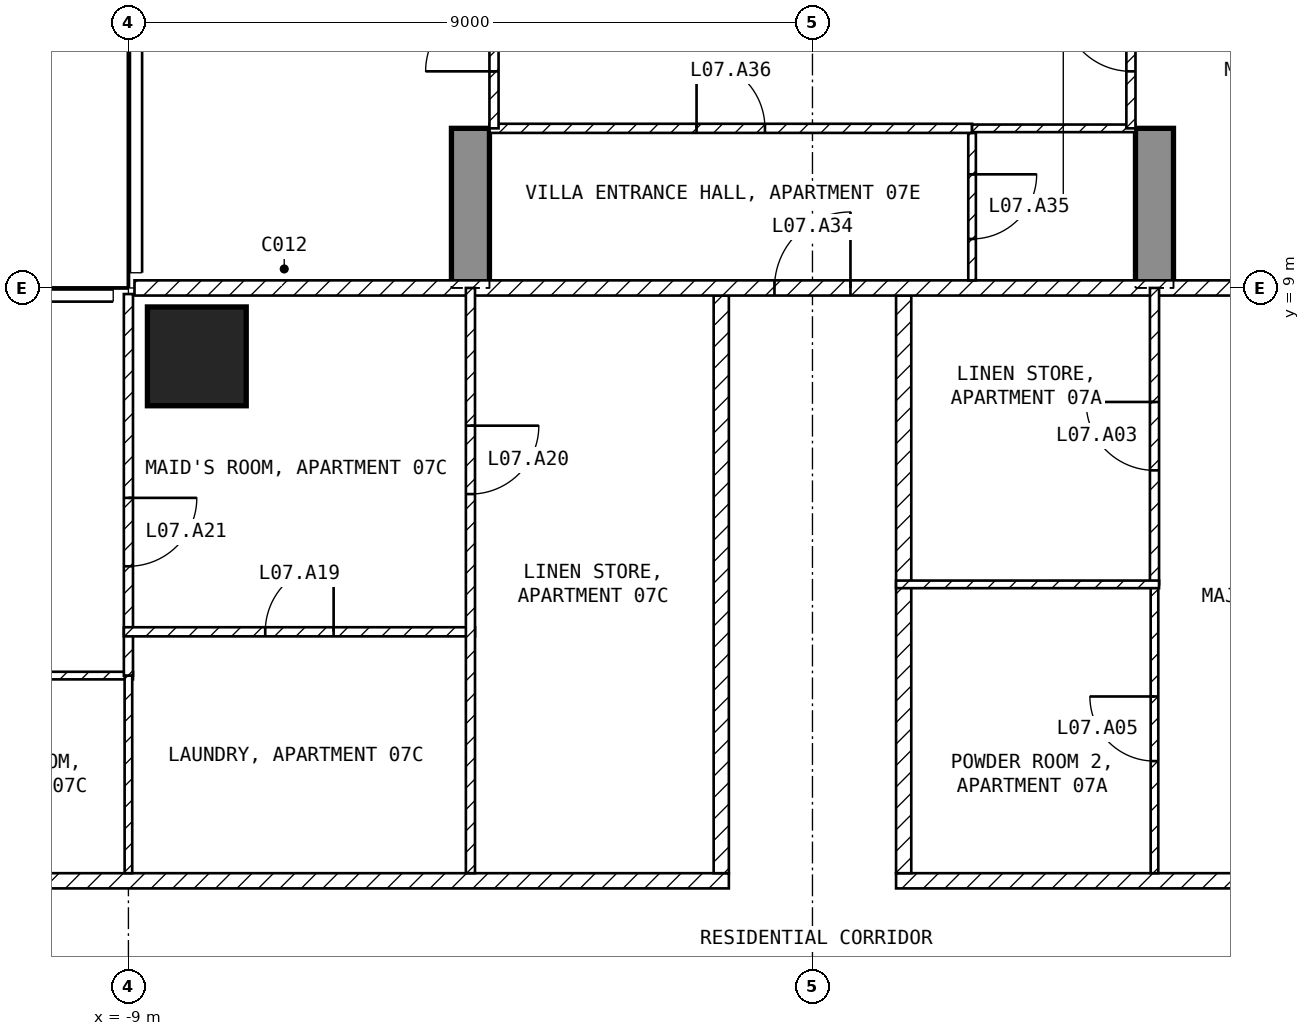
"""IFC4 building model, lengths in metres.
Left out: names, types, materials, properties, quantities, classifications, styles, units other than length and angle.
Written with IfcOpenShell. Run it as: python <this file> out.ifc"""

import sys

from ifc_helpers import new_model, si_unit, direction, frame, frame_2d, origin, origin_2d, place, context, subcontext, project, spatial, polyline, rectangle, outline, extrude, element, fill, save


model = new_model("IFC4")
c1 = context("Model", 3, precision=1e-05, world=origin(), true_north=direction((0.0, 1.0)))
c2 = subcontext(c1, "Body", "Model", "MODEL_VIEW")
j1 = project(units=[si_unit("LENGTHUNIT", "METRE"), si_unit("PLANEANGLEUNIT", "RADIAN")], contexts=[c1])
p1 = place(None, origin())
s1 = spatial("IfcSite", under=j1, at=p1, CompositionType="ELEMENT")
p2 = place(p1, origin())
s2 = spatial("IfcBuilding", under=s1, at=p2, CompositionType="ELEMENT")
p3 = place(p2, frame((0.0, 0.0, 43.5)))
s3 = spatial("IfcBuildingStorey", under=s2, at=p3, CompositionType="ELEMENT", Elevation=43.5)
p4 = place(p3, frame((-8.1, 8.1, -0.25), z_axis=(0.0, 0.0, 1.0), x_axis=(1.0, 0.0, 0.0)))
e1 = element("IfcColumn", 1, at=p4, inside=s3, PredefinedType="COLUMN", context=c2, shape_type="SweptSolid", body=[
    extrude(rectangle(XDim=1.3, YDim=1.3, at=origin_2d()), origin(), (0.0, 0.0, 1.0), 3.5),
])
for number, where, z_axis, x_axis in (
    (2, (-4.75, 9.0, -0.25), (1.0, 0.0, 0.0), (0.0, 1.0, 0.0)),
    (3, (4.25, 9.0, -0.25), (1.0, 0.0, 0.0), (0.0, 1.0, 0.0)),
):
    element("IfcWall", number, at=place(p3, frame(where, z_axis=z_axis, x_axis=x_axis)), inside=s3, PredefinedType="SHEAR", context=c2, shape_type="SweptSolid", body=[
        extrude(outline(polyline([(0.0, 0.0), (2.1, 0.0), (2.1, 2.65), (4.5, 2.65), (4.5, 0.0), (9.9, 0.0), (9.9, 2.65), (12.3, 2.65), (12.3, 0.0), (16.45, 0.0), (16.45, 3.5), (0.0, 3.5), (0.0, 0.0)])), origin(), (0.0, 0.0, 1.0), 0.5),
    ])
p5 = place(p3, frame((1.1, 1.2, 0.0), z_axis=(0.0, 0.0, 1.0), x_axis=(1.0, 0.0, 0.0)))
e4 = element("IfcWall", 4, at=p5, inside=s3, PredefinedType="PARTITIONING", context=c2, shape_type="SweptSolid", body=[
    extrude(rectangle(XDim=20.5, YDim=0.2, at=frame_2d((10.25, 0.0))), origin(), (0.0, 0.0, 1.0), 3.25),
])
p6 = place(p5, frame((8.6, 0.0, 0.0)))
e5 = element("IfcOpeningElement", 5, at=p6, cuts=e4, PredefinedType="OPENING", context=c2, shape_type="SweptSolid", body=[
    extrude(rectangle(XDim=1.0, YDim=2.1, at=frame_2d((0.5, 1.05))), frame((0.0, 0.11, 0.0), z_axis=(0.0, -1.0, 0.0), x_axis=(1.0, 0.0, 0.0)), (0.0, 0.0, 1.0), 0.22),
])
p7 = place(p3, frame((1.2, 8.9, 0.0), z_axis=(0.0, 0.0, 1.0), x_axis=(0.0, -1.0, 0.0)))
e6 = element("IfcWall", 6, at=p7, inside=s3, PredefinedType="PARTITIONING", context=c2, shape_type="SweptSolid", body=[
    extrude(rectangle(XDim=7.6, YDim=0.2, at=frame_2d((3.8, 0.0))), origin(), (0.0, 0.0, 1.0), 3.25),
])
p8 = place(p3, frame((-21.6, 1.2, 0.0), z_axis=(0.0, 0.0, 1.0), x_axis=(1.0, 0.0, 0.0)))
e7 = element("IfcWall", 7, at=p8, inside=s3, PredefinedType="PARTITIONING", context=c2, shape_type="SweptSolid", body=[
    extrude(rectangle(XDim=20.5, YDim=0.2, at=frame_2d((10.25, 0.0))), origin(), (0.0, 0.0, 1.0), 3.25),
])
p9 = place(p8, frame((7.225, 0.0, 0.0)))
e8 = element("IfcOpeningElement", 8, at=p9, cuts=e7, PredefinedType="OPENING", context=c2, shape_type="SweptSolid", body=[
    extrude(rectangle(XDim=1.0, YDim=2.1, at=frame_2d((0.5, 1.05))), frame((0.0, 0.11, 0.0), z_axis=(0.0, -1.0, 0.0), x_axis=(1.0, 0.0, 0.0)), (0.0, 0.0, 1.0), 0.22),
])
p10 = place(p3, frame((-1.2, 1.3, 0.0), z_axis=(0.0, 0.0, 1.0), x_axis=(0.0, 1.0, 0.0)))
e9 = element("IfcWall", 9, at=p10, inside=s3, PredefinedType="PARTITIONING", context=c2, shape_type="SweptSolid", body=[
    extrude(rectangle(XDim=7.6, YDim=0.2, at=frame_2d((3.8, 0.0))), origin(), (0.0, 0.0, 1.0), 3.25),
])
p11 = place(p3, frame((-8.92, 9.0, 0.0), z_axis=(0.0, 0.0, 1.0), x_axis=(1.0, 0.0, 0.0)))
e10 = element("IfcWall", 10, at=p11, inside=s3, PredefinedType="PARTITIONING", context=c2, shape_type="SweptSolid", body=[
    extrude(rectangle(XDim=17.84, YDim=0.2, at=frame_2d((8.92, 0.0))), origin(), (0.0, 0.0, 1.0), 3.25),
])
p12 = place(p11, frame((8.42, 0.0, 0.0)))
e11 = element("IfcOpeningElement", 11, at=p12, cuts=e10, PredefinedType="OPENING", context=c2, shape_type="SweptSolid", body=[
    extrude(rectangle(XDim=1.0, YDim=2.1, at=frame_2d((0.5, 1.05))), frame((0.0, 0.11, 0.0), z_axis=(0.0, -1.0, 0.0), x_axis=(1.0, 0.0, 0.0)), (0.0, 0.0, 1.0), 0.22),
])
p13 = place(p3, frame((4.5, 1.3, 0.0), z_axis=(0.0, 0.0, 1.0), x_axis=(0.0, 1.0, 0.0)))
e12 = element("IfcWall", 12, at=p13, inside=s3, PredefinedType="PARTITIONING", context=c2, shape_type="SweptSolid", body=[
    extrude(rectangle(XDim=3.8, YDim=0.1, at=frame_2d((1.9, 0.0))), origin(), (0.0, 0.0, 1.0), 3.25),
])
p14 = place(p13, frame((1.475, 0.0, 0.0)))
e13 = element("IfcOpeningElement", 13, at=p14, cuts=e12, PredefinedType="OPENING", context=c2, shape_type="SweptSolid", body=[
    extrude(rectangle(XDim=0.85, YDim=2.1, at=frame_2d((0.425, 1.05))), frame((0.0, 0.06, 0.0), z_axis=(0.0, -1.0, 0.0), x_axis=(1.0, 0.0, 0.0)), (0.0, 0.0, 1.0), 0.12),
])
p15 = place(p3, frame((4.5, 5.1, 0.0), z_axis=(0.0, 0.0, 1.0), x_axis=(0.0, 1.0, 0.0)))
e14 = element("IfcWall", 14, at=p15, inside=s3, PredefinedType="PARTITIONING", context=c2, shape_type="SweptSolid", body=[
    extrude(rectangle(XDim=3.9, YDim=0.12, at=frame_2d((1.95, 0.0))), origin(), (0.0, 0.0, 1.0), 3.25),
])
p16 = place(p15, frame((1.5, 0.0, 0.0)))
e15 = element("IfcOpeningElement", 15, at=p16, cuts=e14, PredefinedType="OPENING", context=c2, shape_type="SweptSolid", body=[
    extrude(rectangle(XDim=0.9, YDim=2.1, at=frame_2d((0.45, 1.05))), frame((0.0, 0.07, 0.0), z_axis=(0.0, -1.0, 0.0), x_axis=(1.0, 0.0, 0.0)), (0.0, 0.0, 1.0), 0.14),
])
p17 = place(p3, frame((1.1, 5.1, 0.0), z_axis=(0.0, 0.0, 1.0), x_axis=(1.0, 0.0, 0.0)))
e16 = element("IfcWall", 16, at=p17, inside=s3, PredefinedType="PARTITIONING", context=c2, shape_type="SweptSolid", body=[
    extrude(rectangle(XDim=3.46, YDim=0.1, at=frame_2d((1.73, 0.0))), origin(), (0.0, 0.0, 1.0), 3.25),
])
p18 = place(p3, frame((-12.15, 3.9, 0.0), z_axis=(0.0, 0.0, 1.0), x_axis=(1.0, 0.0, 0.0)))
e17 = element("IfcWall", 17, at=p18, inside=s3, PredefinedType="PARTITIONING", context=c2, shape_type="SweptSolid", body=[
    extrude(rectangle(XDim=3.21, YDim=0.1, at=frame_2d((1.605, 0.0))), origin(), (0.0, 0.0, 1.0), 3.25),
])
p19 = place(p3, frame((-9.0, 3.9, 0.0), z_axis=(0.0, 0.0, 1.0), x_axis=(0.0, -1.0, 0.0)))
e18 = element("IfcWall", 18, at=p19, inside=s3, PredefinedType="PARTITIONING", context=c2, shape_type="SweptSolid", body=[
    extrude(rectangle(XDim=2.6, YDim=0.1, at=frame_2d((1.3, 0.0))), origin(), (0.0, 0.0, 1.0), 3.25),
])
p20 = place(p3, frame((-9.0, 8.92, 0.0), z_axis=(0.0, 0.0, 1.0), x_axis=(0.0, -1.0, 0.0)))
e19 = element("IfcWall", 19, at=p20, inside=s3, PredefinedType="PARTITIONING", context=c2, shape_type="SweptSolid", body=[
    extrude(rectangle(XDim=5.02, YDim=0.12, at=frame_2d((2.51, 0.0))), origin(), (0.0, 0.0, 1.0), 3.25),
])
p21 = place(p20, frame((2.682, 0.0, 0.0)))
e20 = element("IfcOpeningElement", 20, at=p21, cuts=e19, PredefinedType="OPENING", context=c2, shape_type="SweptSolid", body=[
    extrude(rectangle(XDim=0.9, YDim=2.1, at=frame_2d((0.45, 1.05))), frame((0.0, 0.07, 0.0), z_axis=(0.0, -1.0, 0.0), x_axis=(1.0, 0.0, 0.0)), (0.0, 0.0, 1.0), 0.14),
])
p22 = place(p3, frame((-9.06, 4.476, 0.0), z_axis=(0.0, 0.0, 1.0), x_axis=(1.0, 0.0, 0.0)))
e21 = element("IfcWall", 21, at=p22, inside=s3, PredefinedType="PARTITIONING", context=c2, shape_type="SweptSolid", body=[
    extrude(rectangle(XDim=4.62, YDim=0.12, at=frame_2d((2.31, 0.0))), origin(), (0.0, 0.0, 1.0), 3.25),
])
p23 = place(p22, frame((1.86, 0.0, 0.0)))
e22 = element("IfcOpeningElement", 22, at=p23, cuts=e21, PredefinedType="OPENING", context=c2, shape_type="SweptSolid", body=[
    extrude(rectangle(XDim=0.9, YDim=2.1, at=frame_2d((0.45, 1.05))), frame((0.0, 0.07, 0.0), z_axis=(0.0, -1.0, 0.0), x_axis=(1.0, 0.0, 0.0)), (0.0, 0.0, 1.0), 0.14),
])
p24 = place(p3, frame((-4.5, 9.0, 0.0), z_axis=(0.0, 0.0, 1.0), x_axis=(0.0, -1.0, 0.0)))
e23 = element("IfcWall", 23, at=p24, inside=s3, PredefinedType="PARTITIONING", context=c2, shape_type="SweptSolid", body=[
    extrude(rectangle(XDim=7.7, YDim=0.12, at=frame_2d((3.85, 0.0))), origin(), (0.0, 0.0, 1.0), 3.25),
])
p25 = place(p24, frame((1.812, 0.0, 0.0)))
e24 = element("IfcOpeningElement", 24, at=p25, cuts=e23, PredefinedType="OPENING", context=c2, shape_type="SweptSolid", body=[
    extrude(rectangle(XDim=0.9, YDim=2.1, at=frame_2d((0.45, 1.05))), frame((0.0, 0.07, 0.0), z_axis=(0.0, -1.0, 0.0), x_axis=(1.0, 0.0, 0.0)), (0.0, 0.0, 1.0), 0.14),
])
p26 = place(p3, frame((2.1, 11.04, 0.0), z_axis=(0.0, 0.0, 1.0), x_axis=(0.0, -1.0, 0.0)))
e25 = element("IfcWall", 25, at=p26, inside=s3, PredefinedType="PARTITIONING", context=c2, shape_type="SweptSolid", body=[
    extrude(rectangle(XDim=1.94, YDim=0.1, at=frame_2d((0.97, 0.0))), origin(), (0.0, 0.0, 1.0), 3.25),
])
p27 = place(p26, frame((0.545, 0.0, 0.0)))
e26 = element("IfcOpeningElement", 26, at=p27, cuts=e25, PredefinedType="OPENING", context=c2, shape_type="SweptSolid", body=[
    extrude(rectangle(XDim=0.85, YDim=2.1, at=frame_2d((0.425, 1.05))), frame((0.0, 0.06, 0.0), z_axis=(0.0, -1.0, 0.0), x_axis=(1.0, 0.0, 0.0)), (0.0, 0.0, 1.0), 0.12),
])
p28 = place(p3, frame((-4.25, 11.1, 0.0), z_axis=(0.0, 0.0, 1.0), x_axis=(1.0, 0.0, 0.0)))
e27 = element("IfcWall", 27, at=p28, inside=s3, PredefinedType="PARTITIONING", context=c2, shape_type="SweptSolid", body=[
    extrude(rectangle(XDim=6.35, YDim=0.12, at=frame_2d((3.175, 0.0))), origin(), (0.0, 0.0, 1.0), 3.25),
])
p29 = place(p28, frame((2.725, 0.0, 0.0)))
e28 = element("IfcOpeningElement", 28, at=p29, cuts=e27, PredefinedType="OPENING", context=c2, shape_type="SweptSolid", body=[
    extrude(rectangle(XDim=0.9, YDim=2.1, at=frame_2d((0.45, 1.05))), frame((0.0, 0.07, 0.0), z_axis=(0.0, -1.0, 0.0), x_axis=(1.0, 0.0, 0.0)), (0.0, 0.0, 1.0), 0.14),
])
p30 = place(p3, frame((2.1, 11.1, 0.0), z_axis=(0.0, 0.0, 1.0), x_axis=(1.0, 0.0, 0.0)))
e29 = element("IfcWall", 29, at=p30, inside=s3, PredefinedType="PARTITIONING", context=c2, shape_type="SweptSolid", body=[
    extrude(rectangle(XDim=2.15, YDim=0.1, at=frame_2d((1.075, 0.0))), origin(), (0.0, 0.0, 1.0), 3.25),
])
p31 = place(p3, frame((4.19, 11.1, 0.0), z_axis=(0.0, 0.0, 1.0), x_axis=(0.0, 1.0, 0.0)))
e30 = element("IfcWall", 30, at=p31, inside=s3, PredefinedType="PARTITIONING", context=c2, shape_type="SweptSolid", body=[
    extrude(rectangle(XDim=2.4, YDim=0.12, at=frame_2d((1.2, 0.0))), origin(), (0.0, 0.0, 1.0), 2.4),
])
p32 = place(p31, frame((0.75, 0.0, 0.0)))
e31 = element("IfcOpeningElement", 31, at=p32, cuts=e30, PredefinedType="OPENING", context=c2, shape_type="SweptSolid", body=[
    extrude(rectangle(XDim=0.9, YDim=2.1, at=frame_2d((0.45, 1.05))), frame((0.0, 0.07, 0.0), z_axis=(0.0, -1.0, 0.0), x_axis=(1.0, 0.0, 0.0)), (0.0, 0.0, 1.0), 0.14),
])
p33 = place(p3, frame((-4.19, 11.1, 0.0), z_axis=(0.0, 0.0, 1.0), x_axis=(0.0, 1.0, 0.0)))
e32 = element("IfcWall", 32, at=p33, inside=s3, PredefinedType="PARTITIONING", context=c2, shape_type="SweptSolid", body=[
    extrude(rectangle(XDim=2.4, YDim=0.12, at=frame_2d((1.2, 0.0))), origin(), (0.0, 0.0, 1.0), 2.4),
])
p34 = place(p33, frame((0.75, 0.0, 0.0)))
e33 = element("IfcOpeningElement", 33, at=p34, cuts=e32, PredefinedType="OPENING", context=c2, shape_type="SweptSolid", body=[
    extrude(rectangle(XDim=0.9, YDim=2.1, at=frame_2d((0.45, 1.05))), frame((0.0, 0.07, 0.0), z_axis=(0.0, -1.0, 0.0), x_axis=(1.0, 0.0, 0.0)), (0.0, 0.0, 1.0), 0.14),
])
p35 = place(p16, origin())
e34 = element("IfcDoor", 34, at=p35, inside=s3, OperationType="SINGLE_SWING_RIGHT", PredefinedType="DOOR", context=c2, shape_type="SweptSolid", body=[
    extrude(rectangle(XDim=0.9, YDim=2.1, at=frame_2d((0.45, 1.05))), frame((0.0, 0.025, 0.0), z_axis=(0.0, -1.0, 0.0), x_axis=(1.0, 0.0, 0.0)), (0.0, 0.0, 1.0), 0.05),
])
fill(e15, e34)
p36 = place(p14, origin())
e35 = element("IfcDoor", 35, at=p36, inside=s3, OperationType="SINGLE_SWING_RIGHT", PredefinedType="DOOR", context=c2, shape_type="SweptSolid", body=[
    extrude(rectangle(XDim=0.85, YDim=2.1, at=frame_2d((0.425, 1.05))), frame((0.0, 0.025, 0.0), z_axis=(0.0, -1.0, 0.0), x_axis=(1.0, 0.0, 0.0)), (0.0, 0.0, 1.0), 0.05),
])
fill(e13, e35)
p37 = place(p23, origin())
e36 = element("IfcDoor", 36, at=p37, inside=s3, OperationType="SINGLE_SWING_RIGHT", PredefinedType="DOOR", context=c2, shape_type="SweptSolid", body=[
    extrude(rectangle(XDim=0.9, YDim=2.1, at=frame_2d((0.45, 1.05))), frame((0.0, 0.025, 0.0), z_axis=(0.0, -1.0, 0.0), x_axis=(1.0, 0.0, 0.0)), (0.0, 0.0, 1.0), 0.05),
])
fill(e22, e36)
p38 = place(p25, origin())
e37 = element("IfcDoor", 37, at=p38, inside=s3, OperationType="SINGLE_SWING_LEFT", PredefinedType="DOOR", context=c2, shape_type="SweptSolid", body=[
    extrude(rectangle(XDim=0.9, YDim=2.1, at=frame_2d((0.45, 1.05))), frame((0.0, 0.025, 0.0), z_axis=(0.0, -1.0, 0.0), x_axis=(1.0, 0.0, 0.0)), (0.0, 0.0, 1.0), 0.05),
])
fill(e24, e37)
p39 = place(p21, origin())
e38 = element("IfcDoor", 38, at=p39, inside=s3, OperationType="SINGLE_SWING_LEFT", PredefinedType="DOOR", context=c2, shape_type="SweptSolid", body=[
    extrude(rectangle(XDim=0.9, YDim=2.1, at=frame_2d((0.45, 1.05))), frame((0.0, 0.025, 0.0), z_axis=(0.0, -1.0, 0.0), x_axis=(1.0, 0.0, 0.0)), (0.0, 0.0, 1.0), 0.05),
])
fill(e20, e38)
p40 = place(p12, origin())
e39 = element("IfcDoor", 39, at=p40, inside=s3, OperationType="SINGLE_SWING_RIGHT", PredefinedType="DOOR", context=c2, shape_type="SweptSolid", body=[
    extrude(rectangle(XDim=1.0, YDim=2.1, at=frame_2d((0.5, 1.05))), frame((0.0, 0.025, 0.0), z_axis=(0.0, -1.0, 0.0), x_axis=(1.0, 0.0, 0.0)), (0.0, 0.0, 1.0), 0.05),
])
fill(e11, e39)
p41 = place(p27, origin())
e40 = element("IfcDoor", 40, at=p41, inside=s3, OperationType="SINGLE_SWING_LEFT", PredefinedType="DOOR", context=c2, shape_type="SweptSolid", body=[
    extrude(rectangle(XDim=0.85, YDim=2.1, at=frame_2d((0.425, 1.05))), frame((0.0, 0.025, 0.0), z_axis=(0.0, -1.0, 0.0), x_axis=(1.0, 0.0, 0.0)), (0.0, 0.0, 1.0), 0.05),
])
fill(e26, e40)
p42 = place(p29, origin())
e41 = element("IfcDoor", 41, at=p42, inside=s3, OperationType="SINGLE_SWING_LEFT", PredefinedType="DOOR", context=c2, shape_type="SweptSolid", body=[
    extrude(rectangle(XDim=0.9, YDim=2.1, at=frame_2d((0.45, 1.05))), frame((0.0, 0.025, 0.0), z_axis=(0.0, -1.0, 0.0), x_axis=(1.0, 0.0, 0.0)), (0.0, 0.0, 1.0), 0.05),
])
fill(e28, e41)
p43 = place(p32, origin())
e42 = element("IfcDoor", 42, at=p43, inside=s3, OperationType="SINGLE_SWING_RIGHT", PredefinedType="DOOR", context=c2, shape_type="SweptSolid", body=[
    extrude(rectangle(XDim=0.9, YDim=2.1, at=frame_2d((0.45, 1.05))), frame((0.0, 0.025, 0.0), z_axis=(0.0, -1.0, 0.0), x_axis=(1.0, 0.0, 0.0)), (0.0, 0.0, 1.0), 0.05),
])
fill(e31, e42)
p44 = place(p34, origin())
e43 = element("IfcDoor", 43, at=p44, inside=s3, OperationType="SINGLE_SWING_LEFT", PredefinedType="DOOR", context=c2, shape_type="SweptSolid", body=[
    extrude(rectangle(XDim=0.9, YDim=2.1, at=frame_2d((0.45, 1.05))), frame((0.0, 0.025, 0.0), z_axis=(0.0, -1.0, 0.0), x_axis=(1.0, 0.0, 0.0)), (0.0, 0.0, 1.0), 0.05),
])
fill(e33, e43)
save(model, sys.argv[1])
